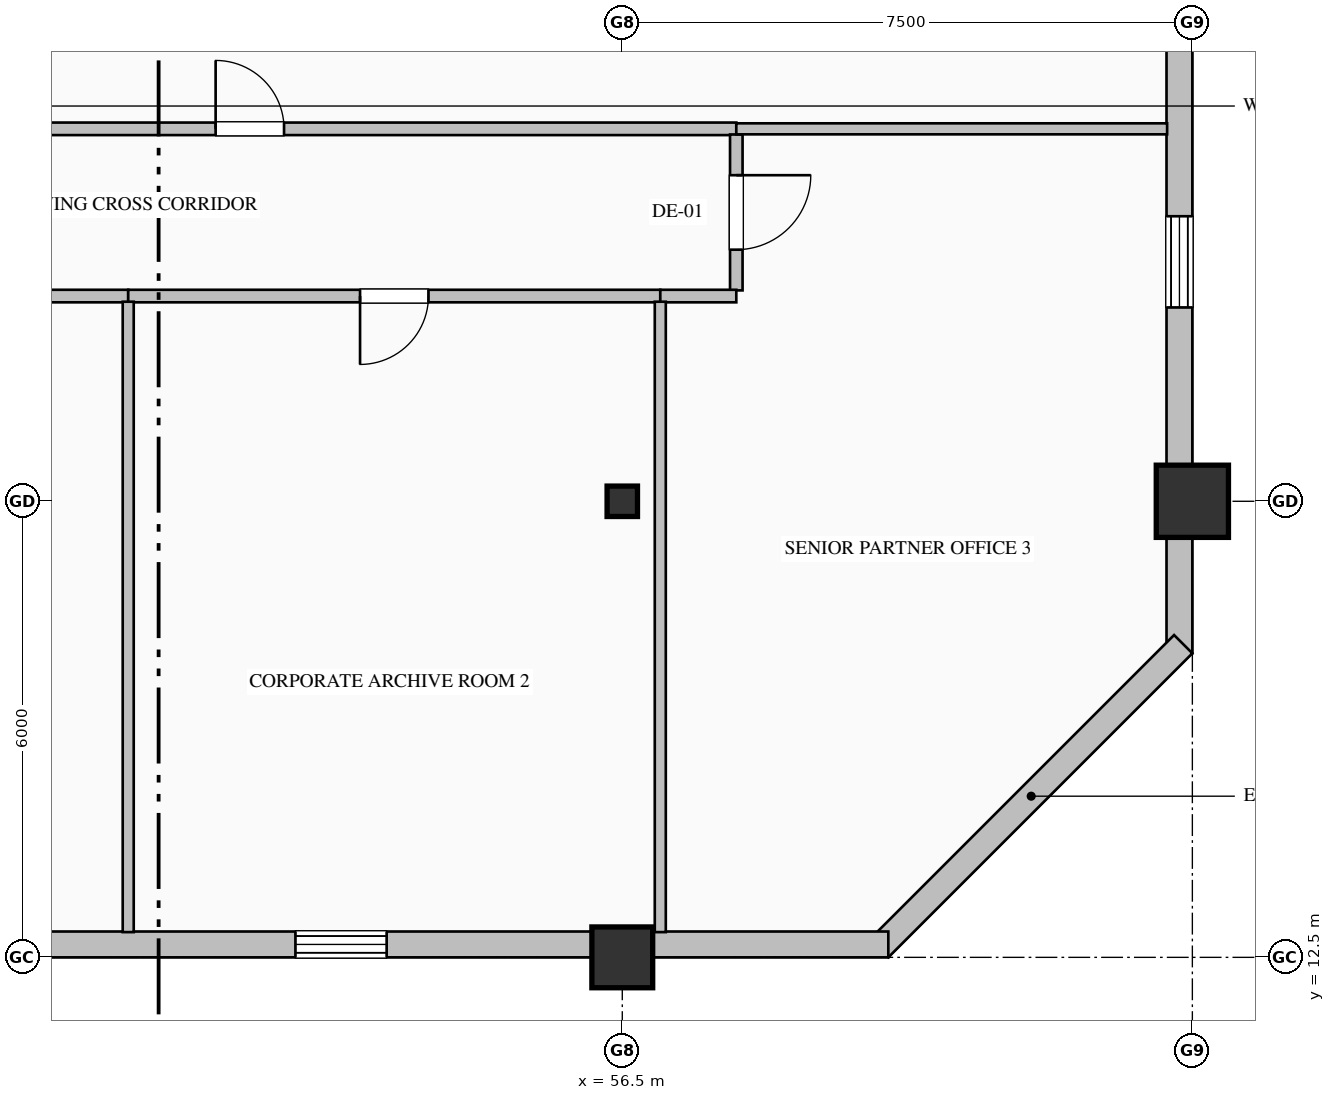
"""IFC4 building model, lengths in metres.
Left out: names, types, materials, properties, quantities, classifications, styles, units other than length and angle.
Written with IfcOpenShell. Run it as: python <this file> out.ifc"""

import sys

from ifc_helpers import new_model, si_unit, direction, frame, frame_2d, origin, origin_2d, place, context, subcontext, project, spatial, rectangle, hollow_rectangle, i_section, extrude, element, fill, save


model = new_model("IFC4")
c1 = context("Model", 3, precision=1e-05, world=origin(), true_north=direction((0.0, 1.0)))
c2 = subcontext(c1, "Body", "Model", "MODEL_VIEW")
j1 = project(units=[si_unit("LENGTHUNIT", "METRE"), si_unit("PLANEANGLEUNIT", "RADIAN")], contexts=[c1])
p1 = place(None, origin())
s1 = spatial("IfcSite", under=j1, at=p1, CompositionType="ELEMENT")
p2 = place(p1, origin())
s2 = spatial("IfcBuilding", under=s1, at=p2, CompositionType="ELEMENT")
p3 = place(p2, frame((0.0, 0.0, 273.8)))
s3 = spatial("IfcBuildingStorey", under=s2, at=p3, CompositionType="ELEMENT", Elevation=273.8)
p4 = place(p3, frame((56.5, 12.5, 0.0), z_axis=(0.0, 0.0, 1.0), x_axis=(1.0, 0.0, 0.0)))
e1 = element("IfcColumn", 1, at=p4, inside=s3, PredefinedType="COLUMN", context=c2, shape_type="SweptSolid", body=[
    extrude(hollow_rectangle(XDim=0.8, YDim=0.8, WallThickness=0.032, at=origin_2d()), origin(), (0.0, 0.0, 1.0), 4.0),
])
p5 = place(p3, frame((56.5, 18.5, 0.0), z_axis=(0.0, 0.0, 1.0), x_axis=(1.0, 0.0, 0.0)))
e2 = element("IfcColumn", 2, at=p5, inside=s3, PredefinedType="COLUMN", context=c2, shape_type="SweptSolid", body=[
    extrude(i_section(OverallWidth=0.4, OverallDepth=0.4, WebThickness=0.013, FlangeThickness=0.021, FilletRadius=0.022, at=origin_2d()), origin(), (0.0, 0.0, 1.0), 4.0),
])
p6 = place(p3, frame((64.0, 18.5, 0.0), z_axis=(0.0, 0.0, 1.0), x_axis=(1.0, 0.0, 0.0)))
e3 = element("IfcColumn", 3, at=p6, inside=s3, PredefinedType="COLUMN", context=c2, shape_type="SweptSolid", body=[
    extrude(hollow_rectangle(XDim=0.95, YDim=0.95, WallThickness=0.036, at=origin_2d()), origin(), (0.0, 0.0, 1.0), 4.0),
])
p7 = place(p3, frame((63.83, 36.05, 0.0), z_axis=(0.0, 0.0, 1.0), x_axis=(0.0, -1.0, 0.0)))
e4 = element("IfcWall", 4, at=p7, inside=s3, PredefinedType="SOLIDWALL", context=c2, shape_type="SweptSolid", body=[
    extrude(rectangle(XDim=19.55, YDim=0.34, at=frame_2d((9.775, 0.0))), origin(), (0.0, 0.0, 1.0), 3.325),
])
p8 = place(p7, frame((10.05, 0.0, 0.7)))
e5 = element("IfcOpeningElement", 5, at=p8, cuts=e4, PredefinedType="OPENING", context=c2, shape_type="SweptSolid", body=[
    extrude(rectangle(XDim=1.5, YDim=2.4, at=frame_2d((0.75, 1.2))), frame((0.0, 0.18, 0.0), z_axis=(0.0, -1.0, 0.0), x_axis=(1.0, 0.0, 0.0)), (0.0, 0.0, 1.0), 0.36),
])
p9 = place(p7, frame((13.8, 0.0, 0.9)))
e6 = element("IfcOpeningElement", 6, at=p9, cuts=e4, PredefinedType="OPENING", context=c2, shape_type="SweptSolid", body=[
    extrude(rectangle(XDim=1.2, YDim=1.85, at=frame_2d((0.6, 0.925))), frame((0.0, 0.18, 0.0), z_axis=(0.0, -1.0, 0.0), x_axis=(1.0, 0.0, 0.0)), (0.0, 0.0, 1.0), 0.36),
])
p10 = place(p3, frame((63.88, 16.62, 0.0), z_axis=(0.0, 0.0, 1.0), x_axis=(-0.707106781187, -0.707106781187, 0.0)))
e7 = element("IfcWall", 7, at=p10, inside=s3, PredefinedType="SOLIDWALL", context=c2, shape_type="SweptSolid", body=[
    extrude(rectangle(XDim=5.657, YDim=0.34, at=frame_2d((2.828, 0.0))), origin(), (0.0, 0.0, 1.0), 3.775),
])
p11 = place(p3, frame((60.0, 12.67, 0.0), z_axis=(0.0, 0.0, 1.0), x_axis=(-1.0, 0.0, 0.0)))
e8 = element("IfcWall", 8, at=p11, inside=s3, PredefinedType="SOLIDWALL", context=c2, shape_type="SweptSolid", body=[
    extrude(rectangle(XDim=15.5, YDim=0.34, at=frame_2d((7.75, 0.0))), origin(), (0.0, 0.0, 1.0), 3.325),
])
p12 = place(p11, frame((6.6, 0.0, 0.9)))
e9 = element("IfcOpeningElement", 9, at=p12, cuts=e8, PredefinedType="OPENING", context=c2, shape_type="SweptSolid", body=[
    extrude(rectangle(XDim=1.2, YDim=1.85, at=frame_2d((0.6, 0.925))), frame((0.0, 0.18, 0.0), z_axis=(0.0, -1.0, 0.0), x_axis=(1.0, 0.0, 0.0)), (0.0, 0.0, 1.0), 0.36),
])
p13 = place(p3, frame((45.2, 23.4, 0.0), z_axis=(0.0, 0.0, 1.0), x_axis=(1.0, 0.0, 0.0)))
e10 = element("IfcWall", 10, at=p13, inside=s3, PredefinedType="PARTITIONING", context=c2, shape_type="SweptSolid", body=[
    extrude(rectangle(XDim=12.8, YDim=0.165, at=frame_2d((6.4, 0.0))), origin(), (0.0, 0.0, 1.0), 3.467),
])
p14 = place(p13, frame((5.95, 0.0, 0.0)))
e11 = element("IfcOpeningElement", 11, at=p14, cuts=e10, PredefinedType="OPENING", context=c2, shape_type="SweptSolid", body=[
    extrude(rectangle(XDim=0.9, YDim=2.15, at=frame_2d((0.45, 1.075))), frame((0.0, 0.093, 0.0), z_axis=(0.0, -1.0, 0.0), x_axis=(1.0, 0.0, 0.0)), (0.0, 0.0, 1.0), 0.185),
])
p15 = place(p3, frame((50.0, 21.2, 0.0), z_axis=(0.0, 0.0, 1.0), x_axis=(-1.0, 0.0, 0.0)))
e12 = element("IfcWall", 12, at=p15, inside=s3, PredefinedType="PARTITIONING", context=c2, shape_type="SweptSolid", body=[
    extrude(rectangle(XDim=4.8, YDim=0.165, at=frame_2d((2.4, 0.0))), origin(), (0.0, 0.0, 1.0), 3.775),
])
p16 = place(p3, frame((57.0, 21.2, 0.0), z_axis=(0.0, 0.0, 1.0), x_axis=(-1.0, 0.0, 0.0)))
e13 = element("IfcWall", 13, at=p16, inside=s3, PredefinedType="PARTITIONING", context=c2, shape_type="SweptSolid", body=[
    extrude(rectangle(XDim=7.0, YDim=0.165, at=frame_2d((3.5, 0.0))), origin(), (0.0, 0.0, 1.0), 3.775),
])
p17 = place(p16, frame((3.05, 0.0, 0.0)))
e14 = element("IfcOpeningElement", 14, at=p17, cuts=e13, PredefinedType="OPENING", context=c2, shape_type="SweptSolid", body=[
    extrude(rectangle(XDim=0.9, YDim=2.15, at=frame_2d((0.45, 1.075))), frame((0.0, 0.093, 0.0), z_axis=(0.0, -1.0, 0.0), x_axis=(1.0, 0.0, 0.0)), (0.0, 0.0, 1.0), 0.185),
])
p18 = place(p3, frame((58.0, 23.325, 0.0), z_axis=(0.0, 0.0, 1.0), x_axis=(0.0, -1.0, 0.0)))
e15 = element("IfcWall", 15, at=p18, inside=s3, PredefinedType="PARTITIONING", context=c2, shape_type="SweptSolid", body=[
    extrude(rectangle(XDim=2.051, YDim=0.165, at=frame_2d((1.025, 0.0))), origin(), (0.0, 0.0, 1.0), 3.775),
])
p19 = place(p18, frame((0.535, 0.0, 0.0)))
e16 = element("IfcOpeningElement", 16, at=p19, cuts=e15, PredefinedType="OPENING", context=c2, shape_type="SweptSolid", body=[
    extrude(rectangle(XDim=0.98, YDim=2.25, at=frame_2d((0.49, 1.125))), frame((0.0, 0.093, 0.0), z_axis=(0.0, -1.0, 0.0), x_axis=(1.0, 0.0, 0.0)), (0.0, 0.0, 1.0), 0.185),
])
p20 = place(p3, frame((58.0, 21.2, 0.0), z_axis=(0.0, 0.0, 1.0), x_axis=(-1.0, 0.0, 0.0)))
e17 = element("IfcWall", 17, at=p20, inside=s3, PredefinedType="PARTITIONING", context=c2, shape_type="SweptSolid", body=[
    extrude(rectangle(XDim=1.0, YDim=0.165, at=frame_2d((0.5, 0.0))), origin(), (0.0, 0.0, 1.0), 3.775),
])
p21 = place(p3, frame((63.668, 23.4, 0.0), z_axis=(0.0, 0.0, 1.0), x_axis=(-1.0, 0.0, 0.0)))
e18 = element("IfcWall", 18, at=p21, inside=s3, PredefinedType="PARTITIONING", context=c2, shape_type="SweptSolid", body=[
    extrude(rectangle(XDim=5.668, YDim=0.145, at=frame_2d((2.834, 0.0))), origin(), (0.0, 0.0, 1.0), 3.775),
])
for number, where, z_axis, x_axis in (
    (19, (50.0, 21.125, 0.0), (0.0, 0.0, 1.0), (0.0, -1.0, 0.0)),
    (20, (57.0, 21.125, 0.0), (0.0, 0.0, 1.0), (0.0, -1.0, 0.0)),
):
    element("IfcWall", number, at=place(p3, frame(where, z_axis=z_axis, x_axis=x_axis)), inside=s3, PredefinedType="PARTITIONING", context=c2, shape_type="SweptSolid", body=[
        extrude(rectangle(XDim=8.293, YDim=0.145, at=frame_2d((4.147, 0.0))), origin(), (0.0, 0.0, 1.0), 3.775),
    ])
p22 = place(p9, origin())
e21 = element("IfcWindow", 21, at=p22, inside=s3, PartitioningType="DOUBLE_PANEL_VERTICAL", PredefinedType="WINDOW", context=c2, shape_type="SweptSolid", body=[
    extrude(rectangle(XDim=1.2, YDim=1.85, at=frame_2d((0.6, 0.925))), frame((0.0, 0.15, 0.0), z_axis=(0.0, -1.0, 0.0), x_axis=(1.0, 0.0, 0.0)), (0.0, 0.0, 1.0), 0.06),
])
fill(e6, e21)
p23 = place(p12, origin())
e22 = element("IfcWindow", 22, at=p23, inside=s3, PartitioningType="DOUBLE_PANEL_VERTICAL", PredefinedType="WINDOW", context=c2, shape_type="SweptSolid", body=[
    extrude(rectangle(XDim=1.2, YDim=1.85, at=frame_2d((0.6, 0.925))), frame((0.0, 0.15, 0.0), z_axis=(0.0, -1.0, 0.0), x_axis=(1.0, 0.0, 0.0)), (0.0, 0.0, 1.0), 0.06),
])
fill(e9, e22)
p24 = place(p14, origin())
e23 = element("IfcDoor", 23, at=p24, inside=s3, OperationType="SINGLE_SWING_LEFT", PredefinedType="DOOR", context=c2, shape_type="SweptSolid", body=[
    extrude(rectangle(XDim=0.9, YDim=2.15, at=frame_2d((0.45, 1.075))), frame((0.0, 0.025, 0.0), z_axis=(0.0, -1.0, 0.0), x_axis=(1.0, 0.0, 0.0)), (0.0, 0.0, 1.0), 0.05),
])
fill(e11, e23)
p25 = place(p17, origin())
e24 = element("IfcDoor", 24, at=p25, inside=s3, OperationType="SINGLE_SWING_RIGHT", PredefinedType="DOOR", context=c2, shape_type="SweptSolid", body=[
    extrude(rectangle(XDim=0.9, YDim=2.15, at=frame_2d((0.45, 1.075))), frame((0.0, 0.025, 0.0), z_axis=(0.0, -1.0, 0.0), x_axis=(1.0, 0.0, 0.0)), (0.0, 0.0, 1.0), 0.05),
])
fill(e14, e24)
p26 = place(p19, origin())
e25 = element("IfcDoor", 25, at=p26, inside=s3, OperationType="SINGLE_SWING_LEFT", PredefinedType="DOOR", context=c2, shape_type="SweptSolid", body=[
    extrude(rectangle(XDim=0.98, YDim=2.25, at=frame_2d((0.49, 1.125))), frame((0.0, 0.025, 0.0), z_axis=(0.0, -1.0, 0.0), x_axis=(1.0, 0.0, 0.0)), (0.0, 0.0, 1.0), 0.05),
])
fill(e16, e25)
save(model, sys.argv[1])
